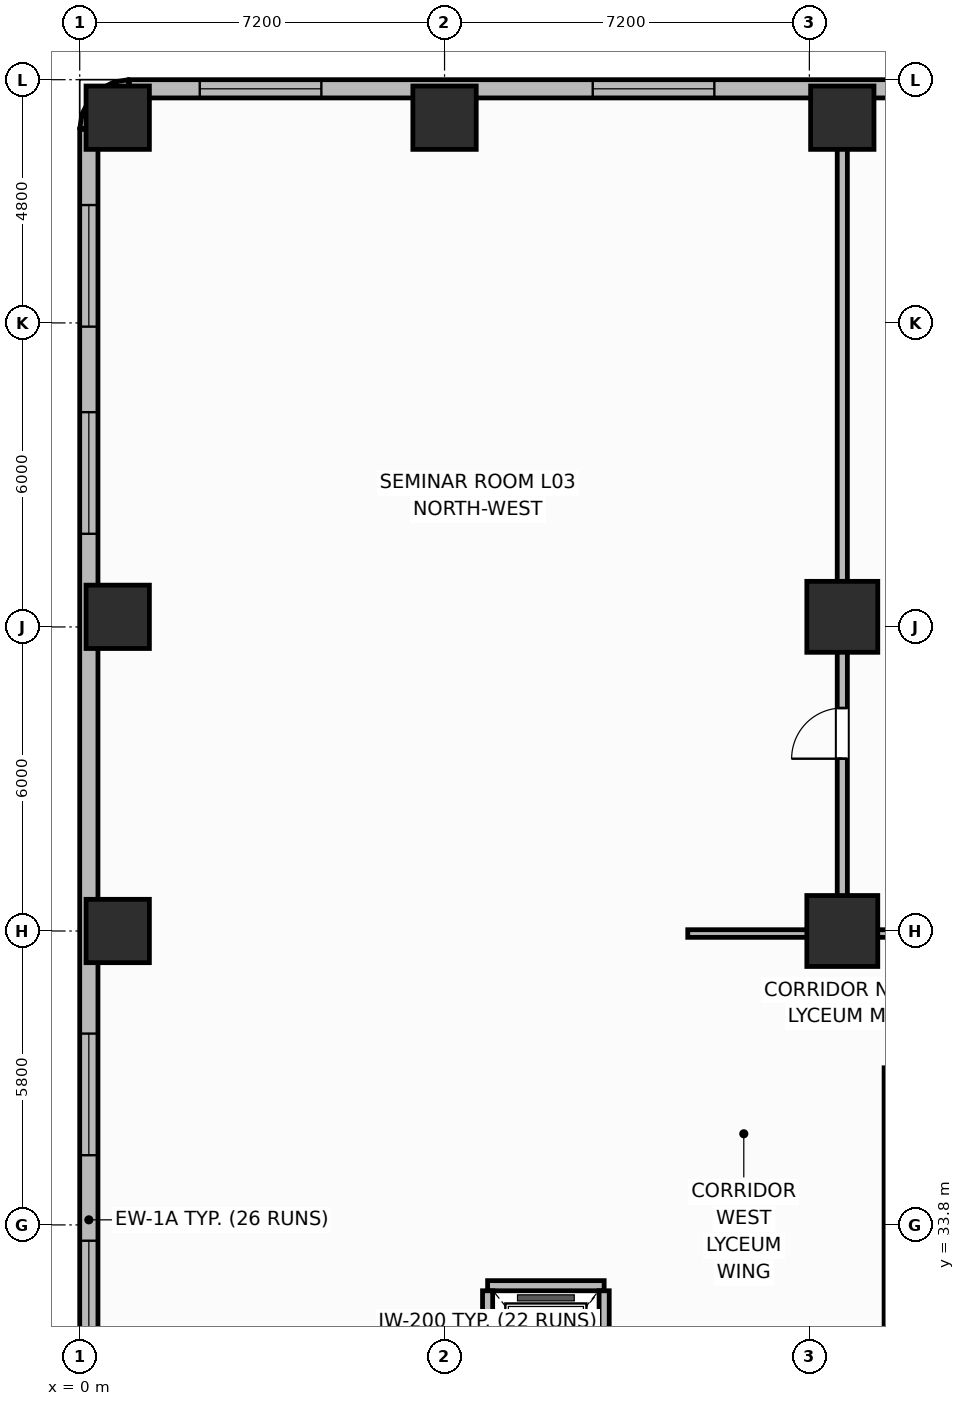
"""IFC4 building model, lengths in metres.
Left out: names, types, materials, properties, quantities, classifications, styles, units other than length and angle.
Written with IfcOpenShell. Run it as: python <this file> out.ifc"""

import sys

from ifc_helpers import new_model, si_unit, direction, frame, frame_2d, origin, origin_2d, place, context, subcontext, project, spatial, rectangle, extrude, element, fill, save


model = new_model("IFC4")
c1 = context("Model", 3, precision=1e-05, world=origin(), true_north=direction((0.0, 1.0)))
c2 = subcontext(c1, "Body", "Model", "MODEL_VIEW")
j1 = project(units=[si_unit("LENGTHUNIT", "METRE"), si_unit("PLANEANGLEUNIT", "RADIAN")], contexts=[c1])
p1 = place(None, origin())
s1 = spatial("IfcSite", under=j1, at=p1, CompositionType="ELEMENT")
p2 = place(p1, origin())
s2 = spatial("IfcBuilding", under=s1, at=p2, CompositionType="ELEMENT")
p3 = place(p2, frame((0.0, 0.0, 15.6)))
s3 = spatial("IfcBuildingStorey", under=s2, at=p3, CompositionType="ELEMENT", Elevation=15.6)
for number, where, z_axis, x_axis in (
    (1, (0.75, 39.6, 0.0), (0.0, 0.0, 1.0), (1.0, 0.0, 0.0)),
    (2, (0.75, 45.8, 0.0), (0.0, 0.0, 1.0), (1.0, 0.0, 0.0)),
    (3, (0.75, 55.65, 0.0), (0.0, 0.0, 1.0), (1.0, 0.0, 0.0)),
    (4, (7.2, 55.65, 0.0), (0.0, 0.0, 1.0), (1.0, 0.0, 0.0)),
    (5, (15.05, 55.65, 0.0), (0.0, 0.0, 1.0), (1.0, 0.0, 0.0)),
):
    element("IfcColumn", number, at=place(p3, frame(where, z_axis=z_axis, x_axis=x_axis)), inside=s3, PredefinedType="COLUMN", context=c2, shape_type="SweptSolid", body=[
        extrude(rectangle(XDim=1.25, YDim=1.25, at=origin_2d()), origin(), (0.0, 0.0, 1.0), 4.5),
    ])
for number, where, z_axis, x_axis in (
    (6, (15.05, 39.6, 0.0), (0.0, 0.0, 1.0), (1.0, 0.0, 0.0)),
    (7, (15.05, 45.8, 0.0), (0.0, 0.0, 1.0), (1.0, 0.0, 0.0)),
):
    element("IfcColumn", number, at=place(p3, frame(where, z_axis=z_axis, x_axis=x_axis)), inside=s3, PredefinedType="COLUMN", context=c2, shape_type="SweptSolid", body=[
        extrude(rectangle(XDim=1.4, YDim=1.4, at=origin_2d()), origin(), (0.0, 0.0, 1.0), 4.5),
    ])
p4 = place(p3, frame((56.57, 56.22, 0.0), z_axis=(0.0, 0.0, 1.0), x_axis=(-1.0, 0.0, 0.0)))
e8 = element("IfcWall", 8, at=p4, inside=s3, PredefinedType="SOLIDWALL", context=c2, shape_type="SweptSolid", body=[
    extrude(rectangle(XDim=55.59, YDim=0.36, at=frame_2d((27.795, 0.0))), origin(), (0.0, 0.0, 1.0), 3.48),
])
p5 = place(p4, frame((5.267, 0.0, 0.85)))
e9 = element("IfcOpeningElement", 9, at=p5, cuts=e8, PredefinedType="OPENING", context=c2, shape_type="SweptSolid", body=[
    extrude(rectangle(XDim=2.4, YDim=2.25, at=frame_2d((1.2, 1.125))), frame((0.0, 0.19, 0.0), z_axis=(0.0, -1.0, 0.0), x_axis=(1.0, 0.0, 0.0)), (0.0, 0.0, 1.0), 0.38),
])
p6 = place(p4, frame((9.145, 0.0, 0.85)))
e10 = element("IfcOpeningElement", 10, at=p6, cuts=e8, PredefinedType="OPENING", context=c2, shape_type="SweptSolid", body=[
    extrude(rectangle(XDim=2.4, YDim=2.25, at=frame_2d((1.2, 1.125))), frame((0.0, 0.19, 0.0), z_axis=(0.0, -1.0, 0.0), x_axis=(1.0, 0.0, 0.0)), (0.0, 0.0, 1.0), 0.38),
])
p7 = place(p4, frame((13.022, 0.0, 0.85)))
e11 = element("IfcOpeningElement", 11, at=p7, cuts=e8, PredefinedType="OPENING", context=c2, shape_type="SweptSolid", body=[
    extrude(rectangle(XDim=2.4, YDim=2.25, at=frame_2d((1.2, 1.125))), frame((0.0, 0.19, 0.0), z_axis=(0.0, -1.0, 0.0), x_axis=(1.0, 0.0, 0.0)), (0.0, 0.0, 1.0), 0.38),
])
p8 = place(p4, frame((20.778, 0.0, 0.85)))
e12 = element("IfcOpeningElement", 12, at=p8, cuts=e8, PredefinedType="OPENING", context=c2, shape_type="SweptSolid", body=[
    extrude(rectangle(XDim=2.4, YDim=2.25, at=frame_2d((1.2, 1.125))), frame((0.0, 0.19, 0.0), z_axis=(0.0, -1.0, 0.0), x_axis=(1.0, 0.0, 0.0)), (0.0, 0.0, 1.0), 0.38),
])
p9 = place(p4, frame((24.656, 0.0, 0.85)))
e13 = element("IfcOpeningElement", 13, at=p9, cuts=e8, PredefinedType="OPENING", context=c2, shape_type="SweptSolid", body=[
    extrude(rectangle(XDim=2.4, YDim=2.25, at=frame_2d((1.2, 1.125))), frame((0.0, 0.19, 0.0), z_axis=(0.0, -1.0, 0.0), x_axis=(1.0, 0.0, 0.0)), (0.0, 0.0, 1.0), 0.38),
])
p10 = place(p4, frame((32.412, 0.0, 0.85)))
e14 = element("IfcOpeningElement", 14, at=p10, cuts=e8, PredefinedType="OPENING", context=c2, shape_type="SweptSolid", body=[
    extrude(rectangle(XDim=2.4, YDim=2.25, at=frame_2d((1.2, 1.125))), frame((0.0, 0.19, 0.0), z_axis=(0.0, -1.0, 0.0), x_axis=(1.0, 0.0, 0.0)), (0.0, 0.0, 1.0), 0.38),
])
p11 = place(p4, frame((36.29, 0.0, 0.85)))
e15 = element("IfcOpeningElement", 15, at=p11, cuts=e8, PredefinedType="OPENING", context=c2, shape_type="SweptSolid", body=[
    extrude(rectangle(XDim=2.4, YDim=2.25, at=frame_2d((1.2, 1.125))), frame((0.0, 0.19, 0.0), z_axis=(0.0, -1.0, 0.0), x_axis=(1.0, 0.0, 0.0)), (0.0, 0.0, 1.0), 0.38),
])
p12 = place(p4, frame((44.045, 0.0, 0.85)))
e16 = element("IfcOpeningElement", 16, at=p12, cuts=e8, PredefinedType="OPENING", context=c2, shape_type="SweptSolid", body=[
    extrude(rectangle(XDim=2.4, YDim=2.25, at=frame_2d((1.2, 1.125))), frame((0.0, 0.19, 0.0), z_axis=(0.0, -1.0, 0.0), x_axis=(1.0, 0.0, 0.0)), (0.0, 0.0, 1.0), 0.38),
])
p13 = place(p4, frame((51.801, 0.0, 0.85)))
e17 = element("IfcOpeningElement", 17, at=p13, cuts=e8, PredefinedType="OPENING", context=c2, shape_type="SweptSolid", body=[
    extrude(rectangle(XDim=2.4, YDim=2.25, at=frame_2d((1.2, 1.125))), frame((0.0, 0.19, 0.0), z_axis=(0.0, -1.0, 0.0), x_axis=(1.0, 0.0, 0.0)), (0.0, 0.0, 1.0), 0.38),
])
p14 = place(p3, frame((0.98, 56.22, 0.0), z_axis=(0.0, 0.0, 1.0), x_axis=(-0.987731290312, -0.156163049852, 0.0)))
e18 = element("IfcWall", 18, at=p14, inside=s3, PredefinedType="SOLIDWALL", context=c2, shape_type="SweptSolid", body=[
    extrude(rectangle(XDim=0.25, YDim=0.36, at=frame_2d((0.125, 0.0))), origin(), (0.0, 0.0, 1.0), 3.48),
])
p15 = place(p3, frame((0.733, 56.181, 0.0), z_axis=(0.0, 0.0, 1.0), x_axis=(-0.89089067942, -0.454217786225, 0.0)))
e19 = element("IfcWall", 19, at=p15, inside=s3, PredefinedType="SOLIDWALL", context=c2, shape_type="SweptSolid", body=[
    extrude(rectangle(XDim=0.25, YDim=0.36, at=frame_2d((0.125, 0.0))), origin(), (0.0, 0.0, 1.0), 3.48),
])
for number, where, z_axis, x_axis in (
    (20, (0.51, 56.067, 0.0), (0.0, 0.0, 1.0), (-0.707, -0.707, 0.0)),
    (21, (0.333, 55.89, 0.0), (0.0, 0.0, 1.0), (-0.454, -0.891, 0.0)),
):
    element("IfcWall", number, at=place(p3, frame(where, z_axis=z_axis, x_axis=x_axis)), inside=s3, PredefinedType="SOLIDWALL", context=c2, shape_type="SweptSolid", body=[
        extrude(rectangle(XDim=0.25, YDim=0.36, at=frame_2d((0.125, 0.0))), origin(), (0.0, 0.0, 1.0), 3.48),
    ])
p16 = place(p3, frame((0.219, 55.667, 0.0), z_axis=(0.0, 0.0, 1.0), x_axis=(-0.156963773077, -0.987604361038, 0.0)))
e22 = element("IfcWall", 22, at=p16, inside=s3, PredefinedType="SOLIDWALL", context=c2, shape_type="SweptSolid", body=[
    extrude(rectangle(XDim=0.25, YDim=0.36, at=frame_2d((0.125, 0.0))), origin(), (0.0, 0.0, 1.0), 3.48),
])
p17 = place(p3, frame((0.18, 55.42, 0.0), z_axis=(0.0, 0.0, 1.0), x_axis=(0.0, -1.0, 0.0)))
e23 = element("IfcWall", 23, at=p17, inside=s3, PredefinedType="SOLIDWALL", context=c2, shape_type="SweptSolid", body=[
    extrude(rectangle(XDim=54.44, YDim=0.36, at=frame_2d((27.22, 0.0))), origin(), (0.0, 0.0, 1.0), 3.48),
])
p18 = place(p17, frame((1.494, 0.0, 0.85)))
e24 = element("IfcOpeningElement", 24, at=p18, cuts=e23, PredefinedType="OPENING", context=c2, shape_type="SweptSolid", body=[
    extrude(rectangle(XDim=2.4, YDim=2.25, at=frame_2d((1.2, 1.125))), frame((0.0, 0.19, 0.0), z_axis=(0.0, -1.0, 0.0), x_axis=(1.0, 0.0, 0.0)), (0.0, 0.0, 1.0), 0.38),
])
p19 = place(p17, frame((5.582, 0.0, 0.85)))
e25 = element("IfcOpeningElement", 25, at=p19, cuts=e23, PredefinedType="OPENING", context=c2, shape_type="SweptSolid", body=[
    extrude(rectangle(XDim=2.4, YDim=2.25, at=frame_2d((1.2, 1.125))), frame((0.0, 0.19, 0.0), z_axis=(0.0, -1.0, 0.0), x_axis=(1.0, 0.0, 0.0)), (0.0, 0.0, 1.0), 0.38),
])
p20 = place(p17, frame((17.844, 0.0, 0.85)))
e26 = element("IfcOpeningElement", 26, at=p20, cuts=e23, PredefinedType="OPENING", context=c2, shape_type="SweptSolid", body=[
    extrude(rectangle(XDim=2.4, YDim=2.25, at=frame_2d((1.2, 1.125))), frame((0.0, 0.19, 0.0), z_axis=(0.0, -1.0, 0.0), x_axis=(1.0, 0.0, 0.0)), (0.0, 0.0, 1.0), 0.38),
])
p21 = place(p17, frame((21.932, 0.0, 0.85)))
e27 = element("IfcOpeningElement", 27, at=p21, cuts=e23, PredefinedType="OPENING", context=c2, shape_type="SweptSolid", body=[
    extrude(rectangle(XDim=2.4, YDim=2.25, at=frame_2d((1.2, 1.125))), frame((0.0, 0.19, 0.0), z_axis=(0.0, -1.0, 0.0), x_axis=(1.0, 0.0, 0.0)), (0.0, 0.0, 1.0), 0.38),
])
p22 = place(p17, frame((30.108, 0.0, 0.85)))
e28 = element("IfcOpeningElement", 28, at=p22, cuts=e23, PredefinedType="OPENING", context=c2, shape_type="SweptSolid", body=[
    extrude(rectangle(XDim=2.4, YDim=2.25, at=frame_2d((1.2, 1.125))), frame((0.0, 0.19, 0.0), z_axis=(0.0, -1.0, 0.0), x_axis=(1.0, 0.0, 0.0)), (0.0, 0.0, 1.0), 0.38),
])
p23 = place(p17, frame((34.195, 0.0, 0.85)))
e29 = element("IfcOpeningElement", 29, at=p23, cuts=e23, PredefinedType="OPENING", context=c2, shape_type="SweptSolid", body=[
    extrude(rectangle(XDim=2.4, YDim=2.25, at=frame_2d((1.2, 1.125))), frame((0.0, 0.19, 0.0), z_axis=(0.0, -1.0, 0.0), x_axis=(1.0, 0.0, 0.0)), (0.0, 0.0, 1.0), 0.38),
])
p24 = place(p17, frame((46.458, 0.0, 0.85)))
e30 = element("IfcOpeningElement", 30, at=p24, cuts=e23, PredefinedType="OPENING", context=c2, shape_type="SweptSolid", body=[
    extrude(rectangle(XDim=2.4, YDim=2.25, at=frame_2d((1.2, 1.125))), frame((0.0, 0.19, 0.0), z_axis=(0.0, -1.0, 0.0), x_axis=(1.0, 0.0, 0.0)), (0.0, 0.0, 1.0), 0.38),
])
p25 = place(p17, frame((50.546, 0.0, 0.85)))
e31 = element("IfcOpeningElement", 31, at=p25, cuts=e23, PredefinedType="OPENING", context=c2, shape_type="SweptSolid", body=[
    extrude(rectangle(XDim=2.4, YDim=2.25, at=frame_2d((1.2, 1.125))), frame((0.0, 0.19, 0.0), z_axis=(0.0, -1.0, 0.0), x_axis=(1.0, 0.0, 0.0)), (0.0, 0.0, 1.0), 0.38),
])
p26 = place(p3, frame((8.05, 32.6, 0.0), z_axis=(0.0, 0.0, 1.0), x_axis=(1.0, 0.0, 0.0)))
e32 = element("IfcWall", 32, at=p26, inside=s3, PredefinedType="PARTITIONING", context=c2, shape_type="SweptSolid", body=[
    extrude(rectangle(XDim=2.3, YDim=0.2, at=frame_2d((1.15, 0.0))), origin(), (0.0, 0.0, 1.0), 3.42),
])
for number, where, z_axis, x_axis in (
    (33, (8.05, 29.9, 0.0), (0.0, 0.0, 1.0), (0.0, 1.0, 0.0)),
    (34, (10.35, 29.9, 0.0), (0.0, 0.0, 1.0), (0.0, 1.0, 0.0)),
):
    element("IfcWall", number, at=place(p3, frame(where, z_axis=z_axis, x_axis=x_axis)), inside=s3, PredefinedType="PARTITIONING", context=c2, shape_type="SweptSolid", body=[
        extrude(rectangle(XDim=2.6, YDim=0.2, at=frame_2d((1.3, 0.0))), origin(), (0.0, 0.0, 1.0), 3.42),
    ])
p27 = place(p3, frame((15.95, 19.5, 0.0), z_axis=(0.0, 0.0, 1.0), x_axis=(0.0, 1.0, 0.0)))
e35 = element("IfcWall", 35, at=p27, inside=s3, PredefinedType="PARTITIONING", context=c2, shape_type="SweptSolid", body=[
    extrude(rectangle(XDim=17.4, YDim=0.15, at=frame_2d((8.7, 0.0))), origin(), (0.0, 0.0, 1.0), 3.42),
])
p28 = place(p3, frame((15.05, 39.6, 0.0), z_axis=(0.0, 0.0, 1.0), x_axis=(0.0, 1.0, 0.0)))
e36 = element("IfcWall", 36, at=p28, inside=s3, PredefinedType="PARTITIONING", context=c2, shape_type="SweptSolid", body=[
    extrude(rectangle(XDim=16.4, YDim=0.2, at=frame_2d((8.2, 0.0))), origin(), (0.0, 0.0, 1.0), 3.42),
])
p29 = place(p28, frame((3.4, 0.0, 0.0)))
e37 = element("IfcOpeningElement", 37, at=p29, cuts=e36, PredefinedType="OPENING", context=c2, shape_type="SweptSolid", body=[
    extrude(rectangle(XDim=1.0, YDim=2.15, at=frame_2d((0.5, 1.075))), frame((0.0, 0.11, 0.0), z_axis=(0.0, -1.0, 0.0), x_axis=(1.0, 0.0, 0.0)), (0.0, 0.0, 1.0), 0.22),
])
p30 = place(p3, frame((25.25, 39.55, 0.0), z_axis=(0.0, 0.0, 1.0), x_axis=(-1.0, 0.0, 0.0)))
e38 = element("IfcWall", 38, at=p30, inside=s3, PredefinedType="PARTITIONING", context=c2, shape_type="SweptSolid", body=[
    extrude(rectangle(XDim=13.25, YDim=0.15, at=frame_2d((6.625, 0.0))), origin(), (0.0, 0.0, 1.0), 3.42),
])
p31 = place(p30, frame((4.2, 0.0, 0.0)))
e39 = element("IfcOpeningElement", 39, at=p31, cuts=e38, PredefinedType="OPENING", context=c2, shape_type="SweptSolid", body=[
    extrude(rectangle(XDim=1.0, YDim=2.15, at=frame_2d((0.5, 1.075))), frame((0.0, 0.085, 0.0), z_axis=(0.0, -1.0, 0.0), x_axis=(1.0, 0.0, 0.0)), (0.0, 0.0, 1.0), 0.17),
])
p32 = place(p12, origin())
e40 = element("IfcWindow", 40, at=p32, inside=s3, PartitioningType="SINGLE_PANEL", PredefinedType="WINDOW", context=c2, shape_type="SweptSolid", body=[
    extrude(rectangle(XDim=2.4, YDim=2.25, at=frame_2d((1.2, 1.125))), frame((0.0, 0.03, 0.0), z_axis=(0.0, -1.0, 0.0), x_axis=(1.0, 0.0, 0.0)), (0.0, 0.0, 1.0), 0.06),
])
fill(e16, e40)
p33 = place(p13, origin())
e41 = element("IfcWindow", 41, at=p33, inside=s3, PartitioningType="SINGLE_PANEL", PredefinedType="WINDOW", context=c2, shape_type="SweptSolid", body=[
    extrude(rectangle(XDim=2.4, YDim=2.25, at=frame_2d((1.2, 1.125))), frame((0.0, 0.03, 0.0), z_axis=(0.0, -1.0, 0.0), x_axis=(1.0, 0.0, 0.0)), (0.0, 0.0, 1.0), 0.06),
])
fill(e17, e41)
p34 = place(p18, origin())
e42 = element("IfcWindow", 42, at=p34, inside=s3, PartitioningType="SINGLE_PANEL", PredefinedType="WINDOW", context=c2, shape_type="SweptSolid", body=[
    extrude(rectangle(XDim=2.4, YDim=2.25, at=frame_2d((1.2, 1.125))), frame((0.0, 0.03, 0.0), z_axis=(0.0, -1.0, 0.0), x_axis=(1.0, 0.0, 0.0)), (0.0, 0.0, 1.0), 0.06),
])
fill(e24, e42)
p35 = place(p19, origin())
e43 = element("IfcWindow", 43, at=p35, inside=s3, PartitioningType="SINGLE_PANEL", PredefinedType="WINDOW", context=c2, shape_type="SweptSolid", body=[
    extrude(rectangle(XDim=2.4, YDim=2.25, at=frame_2d((1.2, 1.125))), frame((0.0, 0.03, 0.0), z_axis=(0.0, -1.0, 0.0), x_axis=(1.0, 0.0, 0.0)), (0.0, 0.0, 1.0), 0.06),
])
fill(e25, e43)
p36 = place(p20, origin())
e44 = element("IfcWindow", 44, at=p36, inside=s3, PartitioningType="SINGLE_PANEL", PredefinedType="WINDOW", context=c2, shape_type="SweptSolid", body=[
    extrude(rectangle(XDim=2.4, YDim=2.25, at=frame_2d((1.2, 1.125))), frame((0.0, 0.03, 0.0), z_axis=(0.0, -1.0, 0.0), x_axis=(1.0, 0.0, 0.0)), (0.0, 0.0, 1.0), 0.06),
])
fill(e26, e44)
p37 = place(p21, origin())
e45 = element("IfcWindow", 45, at=p37, inside=s3, PartitioningType="SINGLE_PANEL", PredefinedType="WINDOW", context=c2, shape_type="SweptSolid", body=[
    extrude(rectangle(XDim=2.4, YDim=2.25, at=frame_2d((1.2, 1.125))), frame((0.0, 0.03, 0.0), z_axis=(0.0, -1.0, 0.0), x_axis=(1.0, 0.0, 0.0)), (0.0, 0.0, 1.0), 0.06),
])
fill(e27, e45)
p38 = place(p29, origin())
e46 = element("IfcDoor", 46, at=p38, inside=s3, OperationType="SINGLE_SWING_LEFT", PredefinedType="DOOR", context=c2, shape_type="SweptSolid", body=[
    extrude(rectangle(XDim=1.0, YDim=2.15, at=frame_2d((0.5, 1.075))), frame((0.0, 0.025, 0.0), z_axis=(0.0, -1.0, 0.0), x_axis=(1.0, 0.0, 0.0)), (0.0, 0.0, 1.0), 0.05),
])
fill(e37, e46)
save(model, sys.argv[1])
